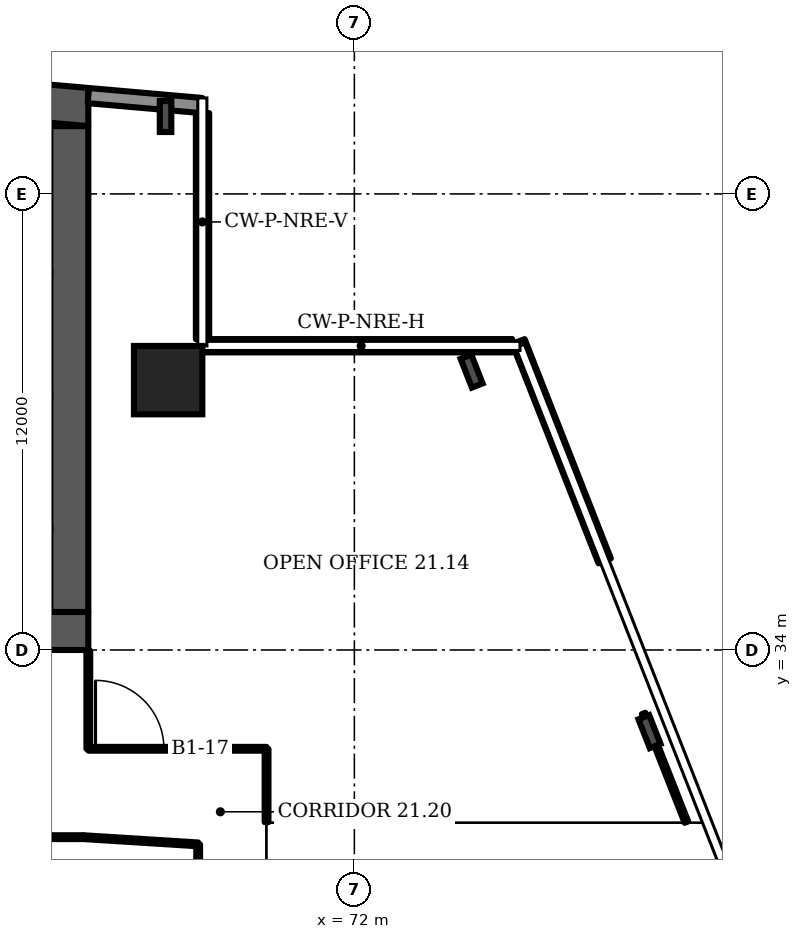
"""IFC4 building model, lengths in metres.
Left out: names, types, materials, properties, quantities, classifications, styles, units other than length and angle.
Written with IfcOpenShell. Run it as: python <this file> out.ifc"""

import sys

from ifc_helpers import new_model, si_unit, direction, frame, frame_2d, origin, origin_2d, place, context, subcontext, project, spatial, polyline, rectangle, i_section, outline, extrude, element, fill, save


model = new_model("IFC4")
c1 = context("Model", 3, precision=1e-05, world=origin(), true_north=direction((0.0, 1.0)))
c2 = subcontext(c1, "Body", "Model", "MODEL_VIEW")
j1 = project(units=[si_unit("LENGTHUNIT", "METRE"), si_unit("PLANEANGLEUNIT", "RADIAN")], contexts=[c1])
p1 = place(None, origin())
s1 = spatial("IfcSite", under=j1, at=p1, CompositionType="ELEMENT")
p2 = place(p1, origin())
s2 = spatial("IfcBuilding", under=s1, at=p2, CompositionType="ELEMENT")
p3 = place(p2, frame((0.0, 0.0, 96.7)))
s3 = spatial("IfcBuildingStorey", under=s2, at=p3, CompositionType="ELEMENT", Elevation=96.7)
p4 = place(p3, origin())
e1 = element("IfcWall", 1, at=p4, inside=s3, PredefinedType="SHEAR", context=c2, shape_type="SweptSolid", body=[
    extrude(outline(polyline([(16.0, 47.784), (40.5, 49.927), (65.0, 47.784), (65.0, 48.787), (40.5, 50.931), (16.0, 48.787), (16.0, 47.784)])), origin(), (0.0, 0.0, 1.0), 3.6),
])
p5 = place(p3, frame((16.0, 34.5, 0.0), z_axis=(0.0, 0.0, 1.0), x_axis=(1.0, 0.0, 0.0)))
e2 = element("IfcWall", 2, at=p5, inside=s3, PredefinedType="SHEAR", context=c2, shape_type="SweptSolid", body=[
    extrude(rectangle(XDim=49.0, YDim=1.0, at=frame_2d((24.5, 0.0))), origin(), (0.0, 0.0, 1.0), 3.6),
])
p6 = place(p5, frame((1.2, 0.0, 0.0)))
e3 = element("IfcOpeningElement", 3, at=p6, cuts=e2, PredefinedType="OPENING", context=c2, shape_type="SweptSolid", body=[
    extrude(rectangle(XDim=1.1, YDim=2.1, at=frame_2d((0.55, 1.05))), frame((0.0, 0.51, 0.0), z_axis=(0.0, -1.0, 0.0), x_axis=(1.0, 0.0, 0.0)), (0.0, 0.0, 1.0), 1.02),
])
p7 = place(p5, frame((5.083, 0.0, 0.0)))
e4 = element("IfcOpeningElement", 4, at=p7, cuts=e2, PredefinedType="OPENING", context=c2, shape_type="SweptSolid", body=[
    extrude(rectangle(XDim=1.1, YDim=2.1, at=frame_2d((0.55, 1.05))), frame((0.0, 0.51, 0.0), z_axis=(0.0, -1.0, 0.0), x_axis=(1.0, 0.0, 0.0)), (0.0, 0.0, 1.0), 1.02),
])
p8 = place(p5, frame((2.933, 0.0, 0.0)))
e5 = element("IfcOpeningElement", 5, at=p8, cuts=e2, PredefinedType="OPENING", context=c2, shape_type="SweptSolid", body=[
    extrude(rectangle(XDim=1.4, YDim=2.1, at=frame_2d((0.7, 1.05))), frame((0.0, 0.51, 0.0), z_axis=(0.0, -1.0, 0.0), x_axis=(1.0, 0.0, 0.0)), (0.0, 0.0, 1.0), 1.02),
])
p9 = place(p5, frame((7.65, 0.0, 0.0)))
e6 = element("IfcOpeningElement", 6, at=p9, cuts=e2, PredefinedType="OPENING", context=c2, shape_type="SweptSolid", body=[
    extrude(rectangle(XDim=1.2, YDim=2.1, at=frame_2d((0.6, 1.05))), frame((0.0, 0.51, 0.0), z_axis=(0.0, -1.0, 0.0), x_axis=(1.0, 0.0, 0.0)), (0.0, 0.0, 1.0), 1.02),
])
p10 = place(p5, frame((14.817, 0.0, 0.0)))
e7 = element("IfcOpeningElement", 7, at=p10, cuts=e2, PredefinedType="OPENING", context=c2, shape_type="SweptSolid", body=[
    extrude(rectangle(XDim=1.1, YDim=2.1, at=frame_2d((0.55, 1.05))), frame((0.0, 0.51, 0.0), z_axis=(0.0, -1.0, 0.0), x_axis=(1.0, 0.0, 0.0)), (0.0, 0.0, 1.0), 1.02),
])
p11 = place(p5, frame((19.083, 0.0, 0.0)))
e8 = element("IfcOpeningElement", 8, at=p11, cuts=e2, PredefinedType="OPENING", context=c2, shape_type="SweptSolid", body=[
    extrude(rectangle(XDim=1.1, YDim=2.1, at=frame_2d((0.55, 1.05))), frame((0.0, 0.51, 0.0), z_axis=(0.0, -1.0, 0.0), x_axis=(1.0, 0.0, 0.0)), (0.0, 0.0, 1.0), 1.02),
])
p12 = place(p5, frame((16.8, 0.0, 0.0)))
e9 = element("IfcOpeningElement", 9, at=p12, cuts=e2, PredefinedType="OPENING", context=c2, shape_type="SweptSolid", body=[
    extrude(rectangle(XDim=1.4, YDim=2.1, at=frame_2d((0.7, 1.05))), frame((0.0, 0.51, 0.0), z_axis=(0.0, -1.0, 0.0), x_axis=(1.0, 0.0, 0.0)), (0.0, 0.0, 1.0), 1.02),
])
p13 = place(p5, frame((21.817, 0.0, 0.0)))
e10 = element("IfcOpeningElement", 10, at=p13, cuts=e2, PredefinedType="OPENING", context=c2, shape_type="SweptSolid", body=[
    extrude(rectangle(XDim=1.1, YDim=2.1, at=frame_2d((0.55, 1.05))), frame((0.0, 0.51, 0.0), z_axis=(0.0, -1.0, 0.0), x_axis=(1.0, 0.0, 0.0)), (0.0, 0.0, 1.0), 1.02),
])
p14 = place(p5, frame((26.083, 0.0, 0.0)))
e11 = element("IfcOpeningElement", 11, at=p14, cuts=e2, PredefinedType="OPENING", context=c2, shape_type="SweptSolid", body=[
    extrude(rectangle(XDim=1.1, YDim=2.1, at=frame_2d((0.55, 1.05))), frame((0.0, 0.51, 0.0), z_axis=(0.0, -1.0, 0.0), x_axis=(1.0, 0.0, 0.0)), (0.0, 0.0, 1.0), 1.02),
])
p15 = place(p5, frame((33.15, 0.0, 0.0)))
e12 = element("IfcOpeningElement", 12, at=p15, cuts=e2, PredefinedType="OPENING", context=c2, shape_type="SweptSolid", body=[
    extrude(rectangle(XDim=1.2, YDim=2.1, at=frame_2d((0.6, 1.05))), frame((0.0, 0.51, 0.0), z_axis=(0.0, -1.0, 0.0), x_axis=(1.0, 0.0, 0.0)), (0.0, 0.0, 1.0), 1.02),
])
p16 = place(p5, frame((37.8, 0.0, 0.0)))
e13 = element("IfcOpeningElement", 13, at=p16, cuts=e2, PredefinedType="OPENING", context=c2, shape_type="SweptSolid", body=[
    extrude(rectangle(XDim=1.4, YDim=2.1, at=frame_2d((0.7, 1.05))), frame((0.0, 0.51, 0.0), z_axis=(0.0, -1.0, 0.0), x_axis=(1.0, 0.0, 0.0)), (0.0, 0.0, 1.0), 1.02),
])
p17 = place(p5, frame((42.817, 0.0, 0.0)))
e14 = element("IfcOpeningElement", 14, at=p17, cuts=e2, PredefinedType="OPENING", context=c2, shape_type="SweptSolid", body=[
    extrude(rectangle(XDim=1.1, YDim=2.1, at=frame_2d((0.55, 1.05))), frame((0.0, 0.51, 0.0), z_axis=(0.0, -1.0, 0.0), x_axis=(1.0, 0.0, 0.0)), (0.0, 0.0, 1.0), 1.02),
])
p18 = place(p5, frame((46.7, 0.0, 0.0)))
e15 = element("IfcOpeningElement", 15, at=p18, cuts=e2, PredefinedType="OPENING", context=c2, shape_type="SweptSolid", body=[
    extrude(rectangle(XDim=1.1, YDim=2.1, at=frame_2d((0.55, 1.05))), frame((0.0, 0.51, 0.0), z_axis=(0.0, -1.0, 0.0), x_axis=(1.0, 0.0, 0.0)), (0.0, 0.0, 1.0), 1.02),
])
p19 = place(p5, frame((44.667, 0.0, 0.0)))
e16 = element("IfcOpeningElement", 16, at=p19, cuts=e2, PredefinedType="OPENING", context=c2, shape_type="SweptSolid", body=[
    extrude(rectangle(XDim=1.4, YDim=2.1, at=frame_2d((0.7, 1.05))), frame((0.0, 0.51, 0.0), z_axis=(0.0, -1.0, 0.0), x_axis=(1.0, 0.0, 0.0)), (0.0, 0.0, 1.0), 1.02),
])
p20 = place(p3, frame((64.5, 35.0, 0.0), z_axis=(0.0, 0.0, 1.0), x_axis=(0.0, 1.0, 0.0)))
e17 = element("IfcWall", 17, at=p20, inside=s3, PredefinedType="SHEAR", context=c2, shape_type="SweptSolid", body=[
    extrude(rectangle(XDim=12.784, YDim=1.0, at=frame_2d((6.392, 0.0))), origin(), (0.0, 0.0, 1.0), 3.6),
])
p21 = place(p3, frame((67.1, 41.1, 0.0), z_axis=(0.0, 0.0, 1.0), x_axis=(1.0, 0.0, 0.0)))
e18 = element("IfcColumn", 18, at=p21, inside=s3, PredefinedType="COLUMN", context=c2, shape_type="SweptSolid", body=[
    extrude(rectangle(XDim=1.8, YDim=1.8, at=origin_2d()), origin(), (0.0, 0.0, 1.0), 3.6),
])
for number, where, z_axis, x_axis in (
    (19, (79.766, 31.853, 0.0), (0.0, 0.0, 1.0), (0.931, 0.366, 0.0)),
    (20, (75.085, 41.338, 0.0), (0.0, 0.0, 1.0), (0.931, 0.366, 0.0)),
    (21, (67.032, 48.036, 0.0), (0.0, 0.0, 1.0), (1.0, 0.0, 0.0)),
):
    element("IfcColumn", number, at=place(p3, frame(where, z_axis=z_axis, x_axis=x_axis)), inside=s3, PredefinedType="COLUMN", context=c2, shape_type="SweptSolid", body=[
        extrude(i_section(OverallWidth=0.303, OverallDepth=0.814, WebThickness=0.021, FlangeThickness=0.04, FilletRadius=0.03, at=origin_2d()), origin(), (0.0, 0.0, 1.0), 3.6),
    ])
p22 = place(p3, frame((67.983, 48.326, 0.0), z_axis=(0.0, 0.0, 1.0), x_axis=(-0.996194, 0.087168, 0.0)))
e22 = element("IfcWall", 22, at=p22, inside=s3, PredefinedType="SOLIDWALL", context=c2, shape_type="SweptSolid", body=[
    extrude(rectangle(XDim=2.994, YDim=0.4, at=frame_2d((1.497, 0.0))), origin(), (0.0, 0.0, 1.0), 3.2),
])
p23 = place(p3, frame((78.586, 36.344, 0.0), z_axis=(0.0, 0.0, 1.0), x_axis=(-0.365792, 0.930699, 0.0)))
e23 = element("IfcWall", 23, at=p23, inside=s3, PredefinedType="SOLIDWALL", context=c2, shape_type="SweptSolid", body=[
    extrude(rectangle(XDim=6.202, YDim=0.35, at=frame_2d((3.101, 0.0))), origin(), (0.0, 0.0, 1.0), 1.0),
])
p24 = place(p3, frame((76.155, 42.005, 0.0), z_axis=(0.0, 0.0, 1.0), x_axis=(-1.0, 0.0, 0.0)))
e24 = element("IfcWall", 24, at=p24, inside=s3, PredefinedType="SOLIDWALL", context=c2, shape_type="SweptSolid", body=[
    extrude(rectangle(XDim=8.155, YDim=0.35, at=frame_2d((4.078, 0.0))), origin(), (0.0, 0.0, 1.0), 1.0),
])
p25 = place(p3, frame((68.005, 42.18, 0.0), z_axis=(0.0, 0.0, 1.0), x_axis=(0.0, 1.0, 0.0)))
e25 = element("IfcWall", 25, at=p25, inside=s3, PredefinedType="SOLIDWALL", context=c2, shape_type="SweptSolid", body=[
    extrude(rectangle(XDim=5.947, YDim=0.35, at=frame_2d((2.973, 0.0))), origin(), (0.0, 0.0, 1.0), 1.0),
])
p26 = place(p3, frame((63.575, 29.075, 0.0), z_axis=(0.0, 0.0, 1.0), x_axis=(1.0, 0.0, 0.0)))
e26 = element("IfcWall", 26, at=p26, inside=s3, PredefinedType="PARTITIONING", context=c2, shape_type="SweptSolid", body=[
    extrude(rectangle(XDim=1.285, YDim=0.1, at=frame_2d((0.643, 0.0))), origin(), (0.0, 0.0, 1.0), 3.2),
])
p27 = place(p3, frame((65.0, 31.4, 0.0), z_axis=(0.0, 0.0, 1.0), x_axis=(0.0, 1.0, 0.0)))
e27 = element("IfcWall", 27, at=p27, inside=s3, PredefinedType="PARTITIONING", context=c2, shape_type="SweptSolid", body=[
    extrude(rectangle(XDim=2.58, YDim=0.1, at=frame_2d((1.29, 0.0))), origin(), (0.0, 0.0, 1.0), 3.2),
])
p28 = place(p3, frame((65.0, 31.4, 0.0), z_axis=(0.0, 0.0, 1.0), x_axis=(1.0, 0.0, 0.0)))
e28 = element("IfcWall", 28, at=p28, inside=s3, PredefinedType="PARTITIONING", context=c2, shape_type="SweptSolid", body=[
    extrude(rectangle(XDim=4.69, YDim=0.1, at=frame_2d((2.345, 0.0))), origin(), (0.0, 0.0, 1.0), 3.2),
])
p29 = place(p28, frame((0.19, 0.0, 0.0)))
e29 = element("IfcOpeningElement", 29, at=p29, cuts=e28, PredefinedType="OPENING", context=c2, shape_type="SweptSolid", body=[
    extrude(rectangle(XDim=1.8, YDim=2.1, at=frame_2d((0.9, 1.05))), frame((0.0, 0.06, 0.0), z_axis=(0.0, -1.0, 0.0), x_axis=(1.0, 0.0, 0.0)), (0.0, 0.0, 1.0), 0.12),
])
p30 = place(p3, frame((67.89, 24.65, 0.0), z_axis=(0.0, 0.0, 1.0), x_axis=(0.0, 1.0, 0.0)))
e30 = element("IfcWall", 30, at=p30, inside=s3, PredefinedType="PARTITIONING", context=c2, shape_type="SweptSolid", body=[
    extrude(rectangle(XDim=4.235, YDim=0.1, at=frame_2d((2.118, 0.0))), origin(), (0.0, 0.0, 1.0), 3.2),
])
p31 = place(p3, frame((67.89, 28.885, 0.0), z_axis=(0.0, 0.0, 1.0), x_axis=(-0.998031, 0.062786, 0.0)))
e31 = element("IfcWall", 31, at=p31, inside=s3, PredefinedType="PARTITIONING", context=c2, shape_type="SweptSolid", body=[
    extrude(rectangle(XDim=3.021, YDim=0.1, at=frame_2d((1.511, 0.0))), origin(), (0.0, 0.0, 1.0), 3.2),
])
p32 = place(p3, frame((69.69, 29.47, 0.0), z_axis=(0.0, 0.0, 1.0), x_axis=(0.0, 1.0, 0.0)))
e32 = element("IfcWall", 32, at=p32, inside=s3, PredefinedType="PARTITIONING", context=c2, shape_type="SweptSolid", body=[
    extrude(rectangle(XDim=1.93, YDim=0.1, at=frame_2d((0.965, 0.0))), origin(), (0.0, 0.0, 1.0), 3.2),
])
p33 = place(p3, frame((80.737, 29.47, 0.0), z_axis=(0.0, 0.0, 1.0), x_axis=(-0.366592, 0.930378, 0.0)))
e33 = element("IfcWall", 33, at=p33, inside=s3, PredefinedType="PARTITIONING", context=c2, shape_type="SweptSolid", body=[
    extrude(rectangle(XDim=3.074, YDim=0.1, at=frame_2d((1.537, 0.0))), origin(), (0.0, 0.0, 1.0), 2.58),
])
p34 = place(p29, origin())
e34 = element("IfcDoor", 34, at=p34, inside=s3, OperationType="DOUBLE_DOOR_SINGLE_SWING", PredefinedType="DOOR", context=c2, shape_type="SweptSolid", body=[
    extrude(rectangle(XDim=1.8, YDim=2.1, at=frame_2d((0.9, 1.05))), frame((0.0, 0.025, 0.0), z_axis=(0.0, -1.0, 0.0), x_axis=(1.0, 0.0, 0.0)), (0.0, 0.0, 1.0), 0.05),
])
fill(e29, e34)
save(model, sys.argv[1])
